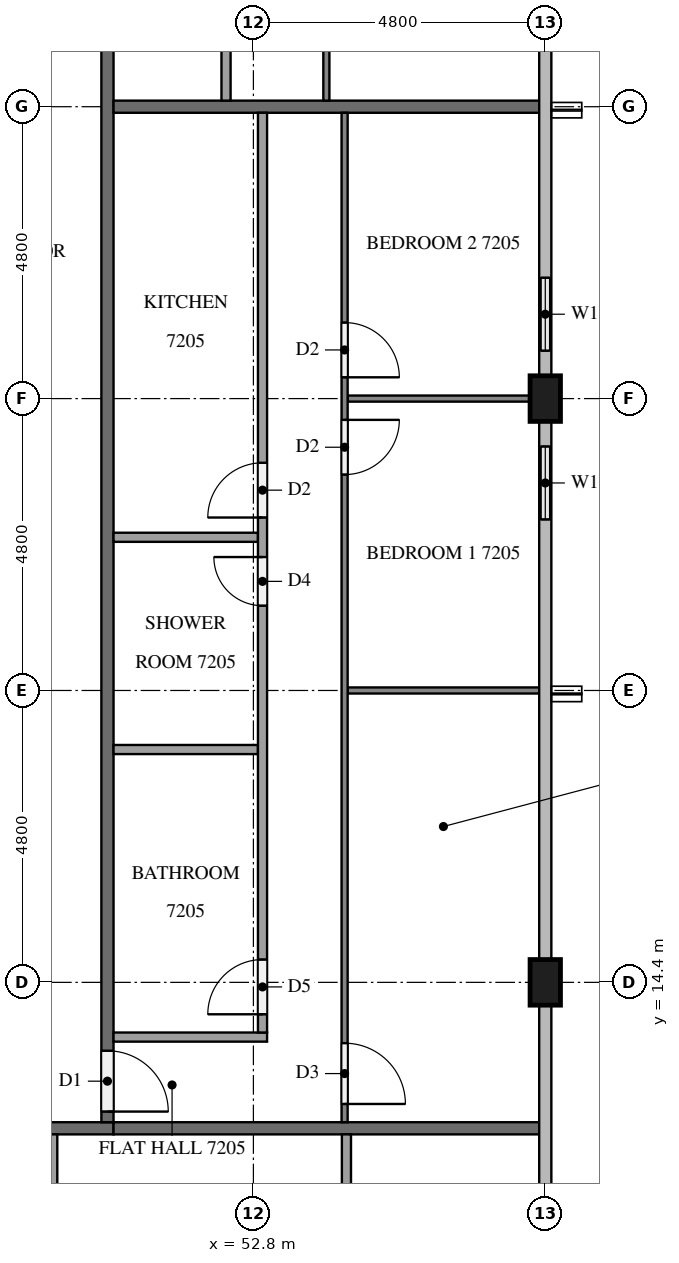
"""IFC4 building model, lengths in metres.
Left out: names, types, materials, properties, quantities, classifications, styles, units other than length and angle.
Written with IfcOpenShell. Run it as: python <this file> out.ifc"""

import sys

from ifc_helpers import new_model, si_unit, direction, frame, frame_2d, origin, origin_2d, place, context, subcontext, project, spatial, rectangle, extrude, element, fill, save


model = new_model("IFC4")
c1 = context("Model", 3, precision=1e-05, world=origin(), true_north=direction((0.0, 1.0)))
c2 = subcontext(c1, "Body", "Model", "MODEL_VIEW")
j1 = project(units=[si_unit("LENGTHUNIT", "METRE"), si_unit("PLANEANGLEUNIT", "RADIAN")], contexts=[c1])
p1 = place(None, origin())
s1 = spatial("IfcSite", under=j1, at=p1, CompositionType="ELEMENT")
p2 = place(p1, origin())
s2 = spatial("IfcBuilding", under=s1, at=p2, CompositionType="ELEMENT")
p3 = place(p2, frame((0.0, 0.0, 275.6)))
s3 = spatial("IfcBuildingStorey", under=s2, at=p3, CompositionType="ELEMENT", Elevation=275.6)
for number, where, z_axis, x_axis in (
    (1, (57.6, 14.4, 0.0), (0.0, 0.0, 1.0), (0.0, 1.0, 0.0)),
    (2, (57.6, 24.0, 0.0), (0.0, 0.0, 1.0), (0.0, 1.0, 0.0)),
):
    element("IfcColumn", number, at=place(p3, frame(where, z_axis=z_axis, x_axis=x_axis)), inside=s3, PredefinedType="COLUMN", context=c2, shape_type="SweptSolid", body=[
        extrude(rectangle(XDim=0.75, YDim=0.5, at=origin_2d()), origin(), (0.0, 0.0, 1.0), 3.2),
    ])
p4 = place(p3, frame((57.6, 21.6, 0.0), z_axis=(0.0, 0.0, 1.0), x_axis=(0.0, 1.0, 0.0)))
e3 = element("IfcWall", 3, at=p4, inside=s3, PredefinedType="SOLIDWALL", context=c2, shape_type="SweptSolid", body=[
    extrude(rectangle(XDim=2.025, YDim=0.15, at=frame_2d((1.012, 0.0))), origin(), (0.0, 0.0, 1.0), 3.2),
])
p5 = place(p4, frame((0.413, 0.0, 0.9)))
e4 = element("IfcOpeningElement", 4, at=p5, cuts=e3, PredefinedType="OPENING", context=c2, shape_type="SweptSolid", body=[
    extrude(rectangle(XDim=1.2, YDim=1.4, at=frame_2d((0.6, 0.7))), frame((0.0, 0.085, 0.0), z_axis=(0.0, -1.0, 0.0), x_axis=(1.0, 0.0, 0.0)), (0.0, 0.0, 1.0), 0.17),
])
p6 = place(p3, frame((57.6, 24.375, 0.0), z_axis=(0.0, 0.0, 1.0), x_axis=(0.0, 1.0, 0.0)))
e5 = element("IfcWall", 5, at=p6, inside=s3, PredefinedType="SOLIDWALL", context=c2, shape_type="SweptSolid", body=[
    extrude(rectangle(XDim=2.025, YDim=0.15, at=frame_2d((1.012, 0.0))), origin(), (0.0, 0.0, 1.0), 3.2),
])
p7 = place(p6, frame((0.413, 0.0, 0.9)))
e6 = element("IfcOpeningElement", 6, at=p7, cuts=e5, PredefinedType="OPENING", context=c2, shape_type="SweptSolid", body=[
    extrude(rectangle(XDim=1.2, YDim=1.4, at=frame_2d((0.6, 0.7))), frame((0.0, 0.085, 0.0), z_axis=(0.0, -1.0, 0.0), x_axis=(1.0, 0.0, 0.0)), (0.0, 0.0, 1.0), 0.17),
])
p8 = place(p3, frame((50.5, 12.0, 0.0), z_axis=(0.0, 0.0, 1.0), x_axis=(-1.0, 0.0, 0.0)))
e7 = element("IfcWall", 7, at=p8, inside=s3, PredefinedType="PARTITIONING", context=c2, shape_type="SweptSolid", body=[
    extrude(rectangle(XDim=38.6, YDim=0.2, at=frame_2d((19.3, 0.0))), origin(), (0.0, 0.0, 1.0), 3.2),
])
p9 = place(p8, frame((31.525, 0.0, 0.0)))
e8 = element("IfcOpeningElement", 8, at=p9, cuts=e7, PredefinedType="OPENING", context=c2, shape_type="SweptSolid", body=[
    extrude(rectangle(XDim=1.1, YDim=2.1, at=frame_2d((0.55, 1.05))), frame((0.0, 0.11, 0.0), z_axis=(0.0, -1.0, 0.0), x_axis=(1.0, 0.0, 0.0)), (0.0, 0.0, 1.0), 0.22),
])
p10 = place(p8, frame((19.575, 0.0, 0.0)))
e9 = element("IfcOpeningElement", 9, at=p10, cuts=e7, PredefinedType="OPENING", context=c2, shape_type="SweptSolid", body=[
    extrude(rectangle(XDim=1.0, YDim=2.1, at=frame_2d((0.5, 1.05))), frame((0.0, 0.11, 0.0), z_axis=(0.0, -1.0, 0.0), x_axis=(1.0, 0.0, 0.0)), (0.0, 0.0, 1.0), 0.22),
])
p11 = place(p8, frame((18.025, 0.0, 0.0)))
e10 = element("IfcOpeningElement", 10, at=p11, cuts=e7, PredefinedType="OPENING", context=c2, shape_type="SweptSolid", body=[
    extrude(rectangle(XDim=1.0, YDim=2.1, at=frame_2d((0.5, 1.05))), frame((0.0, 0.11, 0.0), z_axis=(0.0, -1.0, 0.0), x_axis=(1.0, 0.0, 0.0)), (0.0, 0.0, 1.0), 0.22),
])
p12 = place(p8, frame((1.225, 0.0, 0.0)))
e11 = element("IfcOpeningElement", 11, at=p12, cuts=e7, PredefinedType="OPENING", context=c2, shape_type="SweptSolid", body=[
    extrude(rectangle(XDim=1.0, YDim=2.1, at=frame_2d((0.5, 1.05))), frame((0.0, 0.11, 0.0), z_axis=(0.0, -1.0, 0.0), x_axis=(1.0, 0.0, 0.0)), (0.0, 0.0, 1.0), 0.22),
])
p13 = place(p3, frame((50.4, 40.7, 0.0), z_axis=(0.0, 0.0, 1.0), x_axis=(0.0, -1.0, 0.0)))
e12 = element("IfcWall", 12, at=p13, inside=s3, PredefinedType="PARTITIONING", context=c2, shape_type="SweptSolid", body=[
    extrude(rectangle(XDim=28.6, YDim=0.2, at=frame_2d((14.3, 0.0))), origin(), (0.0, 0.0, 1.0), 3.2),
])
p14 = place(p13, frame((27.425, 0.0, 0.0)))
e13 = element("IfcOpeningElement", 13, at=p14, cuts=e12, PredefinedType="OPENING", context=c2, shape_type="SweptSolid", body=[
    extrude(rectangle(XDim=1.0, YDim=2.1, at=frame_2d((0.5, 1.05))), frame((0.0, 0.11, 0.0), z_axis=(0.0, -1.0, 0.0), x_axis=(1.0, 0.0, 0.0)), (0.0, 0.0, 1.0), 0.22),
])
p15 = place(p13, frame((0.175, 0.0, 0.0)))
e14 = element("IfcOpeningElement", 14, at=p15, cuts=e12, PredefinedType="OPENING", context=c2, shape_type="SweptSolid", body=[
    extrude(rectangle(XDim=1.0, YDim=2.1, at=frame_2d((0.5, 1.05))), frame((0.0, 0.11, 0.0), z_axis=(0.0, -1.0, 0.0), x_axis=(1.0, 0.0, 0.0)), (0.0, 0.0, 1.0), 0.22),
])
for number, where, z_axis, x_axis in (
    (15, (50.5, 12.0, 0.0), (0.0, 0.0, 1.0), (1.0, 0.0, 0.0)),
    (16, (50.5, 28.8, 0.0), (0.0, 0.0, 1.0), (1.0, 0.0, 0.0)),
):
    element("IfcWall", number, at=place(p3, frame(where, z_axis=z_axis, x_axis=x_axis)), inside=s3, PredefinedType="PARTITIONING", context=c2, shape_type="SweptSolid", body=[
        extrude(rectangle(XDim=7.0, YDim=0.2, at=frame_2d((3.5, 0.0))), origin(), (0.0, 0.0, 1.0), 3.2),
    ])
p16 = place(p3, frame((54.33, 11.9, 0.0), z_axis=(0.0, 0.0, 1.0), x_axis=(0.0, -1.0, 0.0)))
e17 = element("IfcWall", 17, at=p16, inside=s3, PredefinedType="PARTITIONING", context=c2, shape_type="SweptSolid", body=[
    extrude(rectangle(XDim=2.975, YDim=0.15, at=frame_2d((1.487, 0.0))), origin(), (0.0, 0.0, 1.0), 3.2),
])
p17 = place(p3, frame((49.5, 11.9, 0.0), z_axis=(0.0, 0.0, 1.0), x_axis=(0.0, -1.0, 0.0)))
e18 = element("IfcWall", 18, at=p17, inside=s3, PredefinedType="PARTITIONING", context=c2, shape_type="SweptSolid", body=[
    extrude(rectangle(XDim=3.125, YDim=0.15, at=frame_2d((1.562, 0.0))), origin(), (0.0, 0.0, 1.0), 3.2),
])
p18 = place(p3, frame((54.35, 19.2, 0.0), z_axis=(0.0, 0.0, 1.0), x_axis=(1.0, 0.0, 0.0)))
e19 = element("IfcWall", 19, at=p18, inside=s3, PredefinedType="PARTITIONING", context=c2, shape_type="SweptSolid", body=[
    extrude(rectangle(XDim=3.15, YDim=0.1, at=frame_2d((1.575, 0.0))), origin(), (0.0, 0.0, 1.0), 3.2),
])
p19 = place(p3, frame((54.35, 24.0, 0.0), z_axis=(0.0, 0.0, 1.0), x_axis=(1.0, 0.0, 0.0)))
e20 = element("IfcWall", 20, at=p19, inside=s3, PredefinedType="PARTITIONING", context=c2, shape_type="SweptSolid", body=[
    extrude(rectangle(XDim=3.0, YDim=0.1, at=frame_2d((1.5, 0.0))), origin(), (0.0, 0.0, 1.0), 3.2),
])
p20 = place(p3, frame((54.3, 28.7, 0.0), z_axis=(0.0, 0.0, 1.0), x_axis=(0.0, -1.0, 0.0)))
e21 = element("IfcWall", 21, at=p20, inside=s3, PredefinedType="PARTITIONING", context=c2, shape_type="SweptSolid", body=[
    extrude(rectangle(XDim=16.6, YDim=0.1, at=frame_2d((8.3, 0.0))), origin(), (0.0, 0.0, 1.0), 3.2),
])
p21 = place(p20, frame((15.3, 0.0, 0.0)))
e22 = element("IfcOpeningElement", 22, at=p21, cuts=e21, PredefinedType="OPENING", context=c2, shape_type="SweptSolid", body=[
    extrude(rectangle(XDim=1.0, YDim=2.1, at=frame_2d((0.5, 1.05))), frame((0.0, 0.06, 0.0), z_axis=(0.0, -1.0, 0.0), x_axis=(1.0, 0.0, 0.0)), (0.0, 0.0, 1.0), 0.12),
])
p22 = place(p20, frame((5.05, 0.0, 0.0)))
e23 = element("IfcOpeningElement", 23, at=p22, cuts=e21, PredefinedType="OPENING", context=c2, shape_type="SweptSolid", body=[
    extrude(rectangle(XDim=0.9, YDim=2.1, at=frame_2d((0.45, 1.05))), frame((0.0, 0.06, 0.0), z_axis=(0.0, -1.0, 0.0), x_axis=(1.0, 0.0, 0.0)), (0.0, 0.0, 1.0), 0.12),
])
p23 = place(p20, frame((3.45, 0.0, 0.0)))
e24 = element("IfcOpeningElement", 24, at=p23, cuts=e21, PredefinedType="OPENING", context=c2, shape_type="SweptSolid", body=[
    extrude(rectangle(XDim=0.9, YDim=2.1, at=frame_2d((0.45, 1.05))), frame((0.0, 0.06, 0.0), z_axis=(0.0, -1.0, 0.0), x_axis=(1.0, 0.0, 0.0)), (0.0, 0.0, 1.0), 0.12),
])
for number, where, z_axis, x_axis in (
    (25, (50.5, 18.229, 0.0), (0.0, 0.0, 1.0), (1.0, 0.0, 0.0)),
    (26, (50.5, 21.719, 0.0), (0.0, 0.0, 1.0), (1.0, 0.0, 0.0)),
):
    element("IfcWall", number, at=place(p3, frame(where, z_axis=z_axis, x_axis=x_axis)), inside=s3, PredefinedType="PARTITIONING", context=c2, shape_type="SweptSolid", body=[
        extrude(rectangle(XDim=2.375, YDim=0.15, at=frame_2d((1.188, 0.0))), origin(), (0.0, 0.0, 1.0), 3.2),
    ])
p24 = place(p3, frame((50.5, 13.5, 0.0), z_axis=(0.0, 0.0, 1.0), x_axis=(1.0, 0.0, 0.0)))
e27 = element("IfcWall", 27, at=p24, inside=s3, PredefinedType="PARTITIONING", context=c2, shape_type="SweptSolid", body=[
    extrude(rectangle(XDim=2.525, YDim=0.15, at=frame_2d((1.262, 0.0))), origin(), (0.0, 0.0, 1.0), 3.2),
])
p25 = place(p3, frame((52.95, 13.575, 0.0), z_axis=(0.0, 0.0, 1.0), x_axis=(0.0, 1.0, 0.0)))
e28 = element("IfcWall", 28, at=p25, inside=s3, PredefinedType="PARTITIONING", context=c2, shape_type="SweptSolid", body=[
    extrude(rectangle(XDim=15.125, YDim=0.15, at=frame_2d((7.562, 0.0))), origin(), (0.0, 0.0, 1.0), 3.2),
])
p26 = place(p25, frame((0.3, 0.0, 0.0)))
e29 = element("IfcOpeningElement", 29, at=p26, cuts=e28, PredefinedType="OPENING", context=c2, shape_type="SweptSolid", body=[
    extrude(rectangle(XDim=0.9, YDim=2.1, at=frame_2d((0.45, 1.05))), frame((0.0, 0.085, 0.0), z_axis=(0.0, -1.0, 0.0), x_axis=(1.0, 0.0, 0.0)), (0.0, 0.0, 1.0), 0.17),
])
p27 = place(p25, frame((7.019, 0.0, 0.0)))
e30 = element("IfcOpeningElement", 30, at=p27, cuts=e28, PredefinedType="OPENING", context=c2, shape_type="SweptSolid", body=[
    extrude(rectangle(XDim=0.8, YDim=2.1, at=frame_2d((0.4, 1.05))), frame((0.0, 0.085, 0.0), z_axis=(0.0, -1.0, 0.0), x_axis=(1.0, 0.0, 0.0)), (0.0, 0.0, 1.0), 0.17),
])
p28 = place(p25, frame((8.469, 0.0, 0.0)))
e31 = element("IfcOpeningElement", 31, at=p28, cuts=e28, PredefinedType="OPENING", context=c2, shape_type="SweptSolid", body=[
    extrude(rectangle(XDim=0.9, YDim=2.1, at=frame_2d((0.45, 1.05))), frame((0.0, 0.085, 0.0), z_axis=(0.0, -1.0, 0.0), x_axis=(1.0, 0.0, 0.0)), (0.0, 0.0, 1.0), 0.17),
])
p29 = place(p3, frame((54.0, 40.7, 0.0), z_axis=(0.0, 0.0, 1.0), x_axis=(0.0, -1.0, 0.0)))
e32 = element("IfcWall", 32, at=p29, inside=s3, PredefinedType="PARTITIONING", context=c2, shape_type="SweptSolid", body=[
    extrude(rectangle(XDim=11.8, YDim=0.1, at=frame_2d((5.9, 0.0))), origin(), (0.0, 0.0, 1.0), 3.2),
])
p30 = place(p29, frame((5.75, 0.0, 0.0)))
e33 = element("IfcOpeningElement", 33, at=p30, cuts=e32, PredefinedType="OPENING", context=c2, shape_type="SweptSolid", body=[
    extrude(rectangle(XDim=1.0, YDim=2.1, at=frame_2d((0.5, 1.05))), frame((0.0, 0.06, 0.0), z_axis=(0.0, -1.0, 0.0), x_axis=(1.0, 0.0, 0.0)), (0.0, 0.0, 1.0), 0.12),
])
p31 = place(p29, frame((7.45, 0.0, 0.0)))
e34 = element("IfcOpeningElement", 34, at=p31, cuts=e32, PredefinedType="OPENING", context=c2, shape_type="SweptSolid", body=[
    extrude(rectangle(XDim=0.9, YDim=2.1, at=frame_2d((0.45, 1.05))), frame((0.0, 0.06, 0.0), z_axis=(0.0, -1.0, 0.0), x_axis=(1.0, 0.0, 0.0)), (0.0, 0.0, 1.0), 0.12),
])
p32 = place(p3, frame((52.35, 28.9, 0.0), z_axis=(0.0, 0.0, 1.0), x_axis=(0.0, 1.0, 0.0)))
e35 = element("IfcWall", 35, at=p32, inside=s3, PredefinedType="PARTITIONING", context=c2, shape_type="SweptSolid", body=[
    extrude(rectangle(XDim=10.325, YDim=0.15, at=frame_2d((5.163, 0.0))), origin(), (0.0, 0.0, 1.0), 3.2),
])
p33 = place(p32, frame((6.52, 0.0, 0.0)))
e36 = element("IfcOpeningElement", 36, at=p33, cuts=e35, PredefinedType="OPENING", context=c2, shape_type="SweptSolid", body=[
    extrude(rectangle(XDim=0.8, YDim=2.1, at=frame_2d((0.4, 1.05))), frame((0.0, 0.085, 0.0), z_axis=(0.0, -1.0, 0.0), x_axis=(1.0, 0.0, 0.0)), (0.0, 0.0, 1.0), 0.17),
])
p34 = place(p32, frame((4.97, 0.0, 0.0)))
e37 = element("IfcOpeningElement", 37, at=p34, cuts=e35, PredefinedType="OPENING", context=c2, shape_type="SweptSolid", body=[
    extrude(rectangle(XDim=0.9, YDim=2.1, at=frame_2d((0.45, 1.05))), frame((0.0, 0.085, 0.0), z_axis=(0.0, -1.0, 0.0), x_axis=(1.0, 0.0, 0.0)), (0.0, 0.0, 1.0), 0.17),
])
p35 = place(p5, origin())
e38 = element("IfcWindow", 38, at=p35, inside=s3, PartitioningType="SINGLE_PANEL", PredefinedType="WINDOW", context=c2, shape_type="SweptSolid", body=[
    extrude(rectangle(XDim=1.2, YDim=1.4, at=frame_2d((0.6, 0.7))), frame((0.0, 0.03, 0.0), z_axis=(0.0, -1.0, 0.0), x_axis=(1.0, 0.0, 0.0)), (0.0, 0.0, 1.0), 0.06),
])
fill(e4, e38)
p36 = place(p7, origin())
e39 = element("IfcWindow", 39, at=p36, inside=s3, PartitioningType="SINGLE_PANEL", PredefinedType="WINDOW", context=c2, shape_type="SweptSolid", body=[
    extrude(rectangle(XDim=1.2, YDim=1.4, at=frame_2d((0.6, 0.7))), frame((0.0, 0.03, 0.0), z_axis=(0.0, -1.0, 0.0), x_axis=(1.0, 0.0, 0.0)), (0.0, 0.0, 1.0), 0.06),
])
fill(e6, e39)
p37 = place(p14, origin())
e40 = element("IfcDoor", 40, at=p37, inside=s3, OperationType="SINGLE_SWING_RIGHT", PredefinedType="DOOR", context=c2, shape_type="SweptSolid", body=[
    extrude(rectangle(XDim=1.0, YDim=2.1, at=frame_2d((0.5, 1.05))), frame((0.0, 0.025, 0.0), z_axis=(0.0, -1.0, 0.0), x_axis=(1.0, 0.0, 0.0)), (0.0, 0.0, 1.0), 0.05),
])
fill(e13, e40)
p38 = place(p21, origin())
e41 = element("IfcDoor", 41, at=p38, inside=s3, OperationType="SINGLE_SWING_RIGHT", PredefinedType="DOOR", context=c2, shape_type="SweptSolid", body=[
    extrude(rectangle(XDim=1.0, YDim=2.1, at=frame_2d((0.5, 1.05))), frame((0.0, 0.025, 0.0), z_axis=(0.0, -1.0, 0.0), x_axis=(1.0, 0.0, 0.0)), (0.0, 0.0, 1.0), 0.05),
])
fill(e22, e41)
p39 = place(p22, origin())
e42 = element("IfcDoor", 42, at=p39, inside=s3, OperationType="SINGLE_SWING_LEFT", PredefinedType="DOOR", context=c2, shape_type="SweptSolid", body=[
    extrude(rectangle(XDim=0.9, YDim=2.1, at=frame_2d((0.45, 1.05))), frame((0.0, 0.025, 0.0), z_axis=(0.0, -1.0, 0.0), x_axis=(1.0, 0.0, 0.0)), (0.0, 0.0, 1.0), 0.05),
])
fill(e23, e42)
p40 = place(p23, origin())
e43 = element("IfcDoor", 43, at=p40, inside=s3, OperationType="SINGLE_SWING_RIGHT", PredefinedType="DOOR", context=c2, shape_type="SweptSolid", body=[
    extrude(rectangle(XDim=0.9, YDim=2.1, at=frame_2d((0.45, 1.05))), frame((0.0, 0.025, 0.0), z_axis=(0.0, -1.0, 0.0), x_axis=(1.0, 0.0, 0.0)), (0.0, 0.0, 1.0), 0.05),
])
fill(e24, e43)
p41 = place(p26, origin())
e44 = element("IfcDoor", 44, at=p41, inside=s3, OperationType="SINGLE_SWING_LEFT", PredefinedType="DOOR", context=c2, shape_type="SweptSolid", body=[
    extrude(rectangle(XDim=0.9, YDim=2.1, at=frame_2d((0.45, 1.05))), frame((0.0, 0.025, 0.0), z_axis=(0.0, -1.0, 0.0), x_axis=(1.0, 0.0, 0.0)), (0.0, 0.0, 1.0), 0.05),
])
fill(e29, e44)
p42 = place(p27, origin())
e45 = element("IfcDoor", 45, at=p42, inside=s3, OperationType="SINGLE_SWING_RIGHT", PredefinedType="DOOR", context=c2, shape_type="SweptSolid", body=[
    extrude(rectangle(XDim=0.8, YDim=2.1, at=frame_2d((0.4, 1.05))), frame((0.0, 0.025, 0.0), z_axis=(0.0, -1.0, 0.0), x_axis=(1.0, 0.0, 0.0)), (0.0, 0.0, 1.0), 0.05),
])
fill(e30, e45)
p43 = place(p28, origin())
e46 = element("IfcDoor", 46, at=p43, inside=s3, OperationType="SINGLE_SWING_LEFT", PredefinedType="DOOR", context=c2, shape_type="SweptSolid", body=[
    extrude(rectangle(XDim=0.9, YDim=2.1, at=frame_2d((0.45, 1.05))), frame((0.0, 0.025, 0.0), z_axis=(0.0, -1.0, 0.0), x_axis=(1.0, 0.0, 0.0)), (0.0, 0.0, 1.0), 0.05),
])
fill(e31, e46)
save(model, sys.argv[1])
